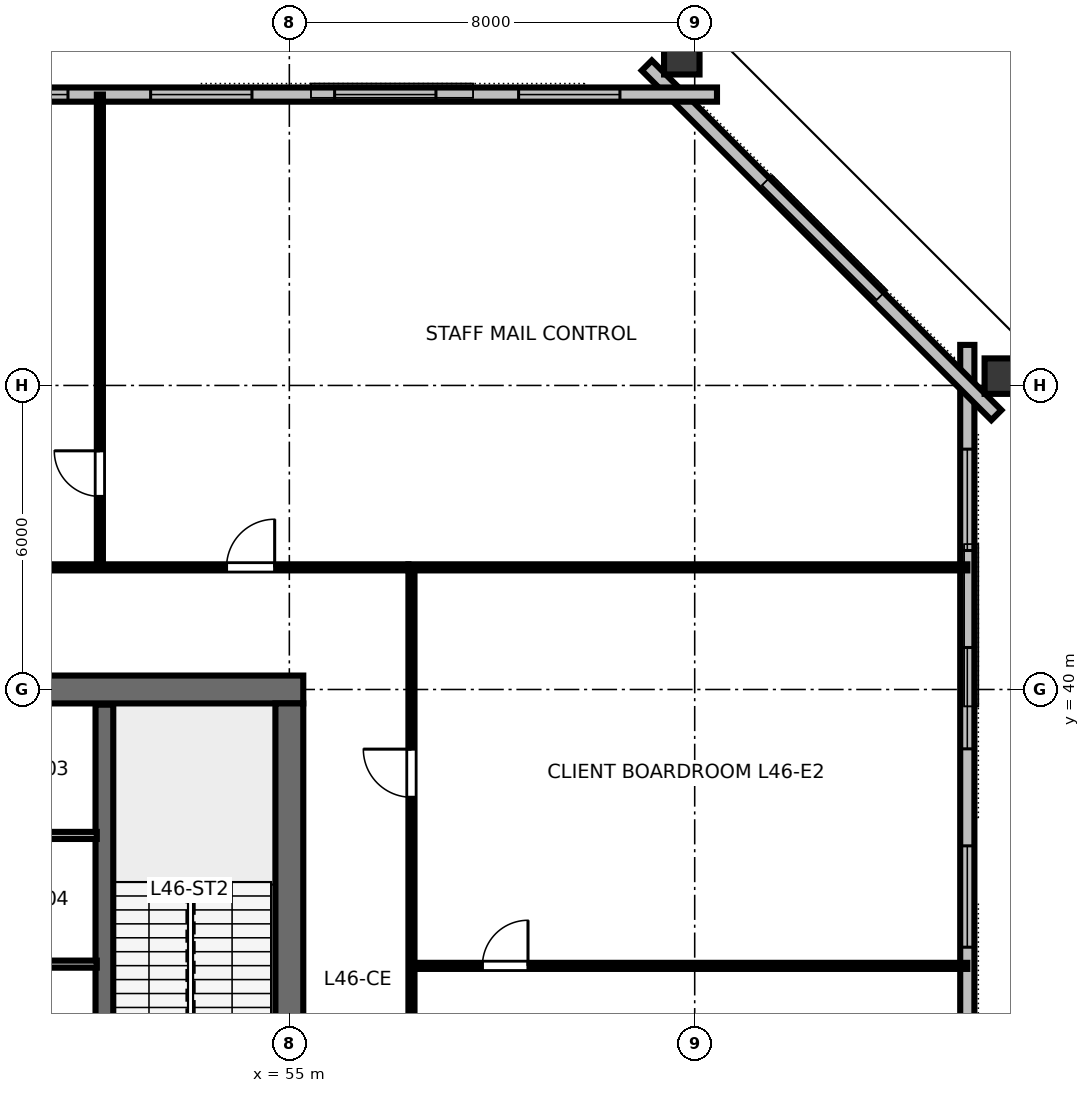
"""IFC4 building model, lengths in metres.
Left out: names, types, materials, properties, quantities, classifications, styles, units other than length and angle.
Written with IfcOpenShell. Run it as: python <this file> out.ifc"""

import sys

from ifc_helpers import new_model, si_unit, direction, frame, frame_2d, origin, origin_2d, place, context, subcontext, project, spatial, rectangle, hollow_rectangle, extrude, element, fill, save


model = new_model("IFC4")
c1 = context("Model", 3, precision=1e-05, world=origin(), true_north=direction((0.0, 1.0)))
c2 = subcontext(c1, "Body", "Model", "MODEL_VIEW")
j1 = project(units=[si_unit("LENGTHUNIT", "METRE"), si_unit("PLANEANGLEUNIT", "RADIAN")], contexts=[c1])
p1 = place(None, origin())
s1 = spatial("IfcSite", under=j1, at=p1, CompositionType="ELEMENT")
p2 = place(p1, origin())
s2 = spatial("IfcBuilding", under=s1, at=p2, CompositionType="ELEMENT")
p3 = place(p2, frame((0.0, 0.0, 177.0)))
s3 = spatial("IfcBuildingStorey", under=s2, at=p3, CompositionType="ELEMENT", Elevation=177.0)
p4 = place(p3, frame((36.725, 40.0, 0.0), z_axis=(0.0, 0.0, 1.0), x_axis=(1.0, 0.0, 0.0)))
e1 = element("IfcWall", 1, at=p4, inside=s3, PredefinedType="SHEAR", context=c2, shape_type="SweptSolid", body=[
    extrude(rectangle(XDim=18.55, YDim=0.55, at=frame_2d((9.275, 0.0))), origin(), (0.0, 0.0, 1.0), 3.36),
])
p5 = place(p4, frame((10.575, 0.0, 0.0)))
e2 = element("IfcOpeningElement", 2, at=p5, cuts=e1, PredefinedType="OPENING", context=c2, shape_type="SweptSolid", body=[
    extrude(rectangle(XDim=1.0, YDim=2.15, at=frame_2d((0.5, 1.075))), frame((0.0, 0.285, 0.0), z_axis=(0.0, -1.0, 0.0), x_axis=(1.0, 0.0, 0.0)), (0.0, 0.0, 1.0), 0.57),
])
p6 = place(p3, frame((55.0, 24.275, 0.0), z_axis=(0.0, 0.0, 1.0), x_axis=(0.0, 1.0, 0.0)))
e3 = element("IfcWall", 3, at=p6, inside=s3, PredefinedType="SHEAR", context=c2, shape_type="SweptSolid", body=[
    extrude(rectangle(XDim=15.45, YDim=0.55, at=frame_2d((7.725, 0.0))), origin(), (0.0, 0.0, 1.0), 3.36),
])
p7 = place(p6, frame((5.25, 0.0, 0.0)))
e4 = element("IfcOpeningElement", 4, at=p7, cuts=e3, PredefinedType="OPENING", context=c2, shape_type="SweptSolid", body=[
    extrude(rectangle(XDim=1.15, YDim=2.15, at=frame_2d((0.575, 1.075))), frame((0.0, 0.285, 0.0), z_axis=(0.0, -1.0, 0.0), x_axis=(1.0, 0.0, 0.0)), (0.0, 0.0, 1.0), 0.57),
])
for number, where, z_axis, x_axis in (
    (5, (69.146, 46.184, 0.0), (0.0, 0.0, 1.0), (0.0, 1.0, 0.0)),
    (6, (62.745, 52.562, 0.0), (0.0, 0.0, 1.0), (1.0, 0.0, 0.0)),
):
    element("IfcColumn", number, at=place(p3, frame(where, z_axis=z_axis, x_axis=x_axis)), inside=s3, PredefinedType="COLUMN", context=c2, shape_type="SweptSolid", body=[
        extrude(hollow_rectangle(XDim=0.7, YDim=0.85, WallThickness=0.04, at=origin_2d()), origin(), (0.0, 0.0, 1.0), 3.358),
    ])
p8 = place(p3, frame((68.38, 17.2, 0.0), z_axis=(0.0, 0.0, 1.0), x_axis=(0.0, 1.0, 0.0)))
e7 = element("IfcWall", 7, at=p8, inside=s3, PredefinedType="STANDARD", context=c2, shape_type="SweptSolid", body=[
    extrude(rectangle(XDim=29.6, YDim=0.28, at=frame_2d((14.8, 0.0))), origin(), (0.0, 0.0, 1.0), 3.36),
])
p9 = place(p8, frame((2.057, 0.0, 0.8)))
e8 = element("IfcOpeningElement", 8, at=p9, cuts=e7, PredefinedType="OPENING", context=c2, shape_type="SweptSolid", body=[
    extrude(rectangle(XDim=2.0, YDim=1.95, at=frame_2d((1.0, 0.975))), frame((0.0, 0.15, 0.0), z_axis=(0.0, -1.0, 0.0), x_axis=(1.0, 0.0, 0.0)), (0.0, 0.0, 1.0), 0.3),
])
p10 = place(p8, frame((5.971, 0.0, 0.8)))
e9 = element("IfcOpeningElement", 9, at=p10, cuts=e7, PredefinedType="OPENING", context=c2, shape_type="SweptSolid", body=[
    extrude(rectangle(XDim=2.0, YDim=1.95, at=frame_2d((1.0, 0.975))), frame((0.0, 0.15, 0.0), z_axis=(0.0, -1.0, 0.0), x_axis=(1.0, 0.0, 0.0)), (0.0, 0.0, 1.0), 0.3),
])
p11 = place(p8, frame((9.886, 0.0, 0.8)))
e10 = element("IfcOpeningElement", 10, at=p11, cuts=e7, PredefinedType="OPENING", context=c2, shape_type="SweptSolid", body=[
    extrude(rectangle(XDim=2.0, YDim=1.95, at=frame_2d((1.0, 0.975))), frame((0.0, 0.15, 0.0), z_axis=(0.0, -1.0, 0.0), x_axis=(1.0, 0.0, 0.0)), (0.0, 0.0, 1.0), 0.3),
])
p12 = place(p8, frame((17.714, 0.0, 0.8)))
e11 = element("IfcOpeningElement", 11, at=p12, cuts=e7, PredefinedType="OPENING", context=c2, shape_type="SweptSolid", body=[
    extrude(rectangle(XDim=2.0, YDim=1.95, at=frame_2d((1.0, 0.975))), frame((0.0, 0.15, 0.0), z_axis=(0.0, -1.0, 0.0), x_axis=(1.0, 0.0, 0.0)), (0.0, 0.0, 1.0), 0.3),
])
p13 = place(p8, frame((21.629, 0.0, 0.8)))
e12 = element("IfcOpeningElement", 12, at=p13, cuts=e7, PredefinedType="OPENING", context=c2, shape_type="SweptSolid", body=[
    extrude(rectangle(XDim=2.0, YDim=1.95, at=frame_2d((1.0, 0.975))), frame((0.0, 0.15, 0.0), z_axis=(0.0, -1.0, 0.0), x_axis=(1.0, 0.0, 0.0)), (0.0, 0.0, 1.0), 0.3),
])
p14 = place(p8, frame((25.543, 0.0, 0.8)))
e13 = element("IfcOpeningElement", 13, at=p14, cuts=e7, PredefinedType="OPENING", context=c2, shape_type="SweptSolid", body=[
    extrude(rectangle(XDim=2.0, YDim=1.95, at=frame_2d((1.0, 0.975))), frame((0.0, 0.15, 0.0), z_axis=(0.0, -1.0, 0.0), x_axis=(1.0, 0.0, 0.0)), (0.0, 0.0, 1.0), 0.3),
])
p15 = place(p3, frame((68.954, 45.415, 0.0), z_axis=(0.0, 0.0, 1.0), x_axis=(-0.707106781187, 0.707106781187, 0.0)))
e14 = element("IfcWall", 14, at=p15, inside=s3, PredefinedType="STANDARD", context=c2, shape_type="SweptSolid", body=[
    extrude(rectangle(XDim=9.757, YDim=0.28, at=frame_2d((4.879, 0.0))), origin(), (0.0, 0.0, 1.0), 3.36),
])
p16 = place(p3, frame((63.44, 51.74, 0.0), z_axis=(0.0, 0.0, 1.0), x_axis=(-1.0, 0.0, 0.0)))
e15 = element("IfcWall", 15, at=p16, inside=s3, PredefinedType="STANDARD", context=c2, shape_type="SweptSolid", body=[
    extrude(rectangle(XDim=34.88, YDim=0.28, at=frame_2d((17.44, 0.0))), origin(), (0.0, 0.0, 1.0), 3.36),
])
p17 = place(p16, frame((1.916, 0.0, 0.8)))
e16 = element("IfcOpeningElement", 16, at=p17, cuts=e15, PredefinedType="OPENING", context=c2, shape_type="SweptSolid", body=[
    extrude(rectangle(XDim=2.0, YDim=1.95, at=frame_2d((1.0, 0.975))), frame((0.0, 0.15, 0.0), z_axis=(0.0, -1.0, 0.0), x_axis=(1.0, 0.0, 0.0)), (0.0, 0.0, 1.0), 0.3),
])
p18 = place(p16, frame((5.547, 0.0, 0.8)))
e17 = element("IfcOpeningElement", 17, at=p18, cuts=e15, PredefinedType="OPENING", context=c2, shape_type="SweptSolid", body=[
    extrude(rectangle(XDim=2.0, YDim=1.95, at=frame_2d((1.0, 0.975))), frame((0.0, 0.15, 0.0), z_axis=(0.0, -1.0, 0.0), x_axis=(1.0, 0.0, 0.0)), (0.0, 0.0, 1.0), 0.3),
])
p19 = place(p16, frame((9.178, 0.0, 0.8)))
e18 = element("IfcOpeningElement", 18, at=p19, cuts=e15, PredefinedType="OPENING", context=c2, shape_type="SweptSolid", body=[
    extrude(rectangle(XDim=2.0, YDim=1.95, at=frame_2d((1.0, 0.975))), frame((0.0, 0.15, 0.0), z_axis=(0.0, -1.0, 0.0), x_axis=(1.0, 0.0, 0.0)), (0.0, 0.0, 1.0), 0.3),
])
p20 = place(p16, frame((12.809, 0.0, 0.8)))
e19 = element("IfcOpeningElement", 19, at=p20, cuts=e15, PredefinedType="OPENING", context=c2, shape_type="SweptSolid", body=[
    extrude(rectangle(XDim=2.0, YDim=1.95, at=frame_2d((1.0, 0.975))), frame((0.0, 0.15, 0.0), z_axis=(0.0, -1.0, 0.0), x_axis=(1.0, 0.0, 0.0)), (0.0, 0.0, 1.0), 0.3),
])
p21 = place(p16, frame((20.071, 0.0, 0.8)))
e20 = element("IfcOpeningElement", 20, at=p21, cuts=e15, PredefinedType="OPENING", context=c2, shape_type="SweptSolid", body=[
    extrude(rectangle(XDim=2.0, YDim=1.95, at=frame_2d((1.0, 0.975))), frame((0.0, 0.15, 0.0), z_axis=(0.0, -1.0, 0.0), x_axis=(1.0, 0.0, 0.0)), (0.0, 0.0, 1.0), 0.3),
])
p22 = place(p16, frame((23.702, 0.0, 0.8)))
e21 = element("IfcOpeningElement", 21, at=p22, cuts=e15, PredefinedType="OPENING", context=c2, shape_type="SweptSolid", body=[
    extrude(rectangle(XDim=2.0, YDim=1.95, at=frame_2d((1.0, 0.975))), frame((0.0, 0.15, 0.0), z_axis=(0.0, -1.0, 0.0), x_axis=(1.0, 0.0, 0.0)), (0.0, 0.0, 1.0), 0.3),
])
p23 = place(p16, frame((27.333, 0.0, 0.8)))
e22 = element("IfcOpeningElement", 22, at=p23, cuts=e15, PredefinedType="OPENING", context=c2, shape_type="SweptSolid", body=[
    extrude(rectangle(XDim=2.0, YDim=1.95, at=frame_2d((1.0, 0.975))), frame((0.0, 0.15, 0.0), z_axis=(0.0, -1.0, 0.0), x_axis=(1.0, 0.0, 0.0)), (0.0, 0.0, 1.0), 0.3),
])
p24 = place(p16, frame((30.964, 0.0, 0.8)))
e23 = element("IfcOpeningElement", 23, at=p24, cuts=e15, PredefinedType="OPENING", context=c2, shape_type="SweptSolid", body=[
    extrude(rectangle(XDim=2.0, YDim=1.95, at=frame_2d((1.0, 0.975))), frame((0.0, 0.15, 0.0), z_axis=(0.0, -1.0, 0.0), x_axis=(1.0, 0.0, 0.0)), (0.0, 0.0, 1.0), 0.3),
])
p25 = place(p3, frame((51.35, 32.0, 0.0), z_axis=(0.0, 0.0, 1.0), x_axis=(0.0, 1.0, 0.0)))
e24 = element("IfcWall", 24, at=p25, inside=s3, PredefinedType="SHEAR", context=c2, shape_type="SweptSolid", body=[
    extrude(rectangle(XDim=7.7, YDim=0.35, at=frame_2d((3.85, 0.0))), origin(), (0.0, 0.0, 1.0), 3.6),
])
for number, where, z_axis, x_axis in (
    (25, (48.8, 34.58, 0.0), (0.0, 0.0, 1.0), (1.0, 0.0, 0.0)),
    (26, (48.8, 37.12, 0.0), (0.0, 0.0, 1.0), (1.0, 0.0, 0.0)),
):
    element("IfcWall", number, at=place(p3, frame(where, z_axis=z_axis, x_axis=x_axis)), inside=s3, PredefinedType="PARTITIONING", context=c2, shape_type="SweptSolid", body=[
        extrude(rectangle(XDim=2.4, YDim=0.14, at=frame_2d((1.2, 0.0))), origin(), (0.0, 0.0, 1.0), 3.36),
    ])
p26 = place(p3, frame((51.261, 42.41, 0.0), z_axis=(0.0, 0.0, 1.0), x_axis=(0.0, 1.0, 0.0)))
e27 = element("IfcWall", 27, at=p26, inside=s3, PredefinedType="PARTITIONING", context=c2, shape_type="SweptSolid", body=[
    extrude(rectangle(XDim=9.33, YDim=0.12, at=frame_2d((4.665, 0.0))), origin(), (0.0, 0.0, 1.0), 2.64),
])
p27 = place(p26, frame((1.4, 0.0, 0.0)))
e28 = element("IfcOpeningElement", 28, at=p27, cuts=e27, PredefinedType="OPENING", context=c2, shape_type="SweptSolid", body=[
    extrude(rectangle(XDim=0.9, YDim=2.15, at=frame_2d((0.45, 1.075))), frame((0.0, 0.07, 0.0), z_axis=(0.0, -1.0, 0.0), x_axis=(1.0, 0.0, 0.0)), (0.0, 0.0, 1.0), 0.14),
])
p28 = place(p3, frame((47.02, 42.41, 0.0), z_axis=(0.0, 0.0, 1.0), x_axis=(1.0, 0.0, 0.0)))
e29 = element("IfcWall", 29, at=p28, inside=s3, PredefinedType="PARTITIONING", context=c2, shape_type="SweptSolid", body=[
    extrude(rectangle(XDim=10.33, YDim=0.12, at=frame_2d((5.165, 0.0))), origin(), (0.0, 0.0, 1.0), 2.64),
])
p29 = place(p28, frame((1.709, 0.0, 0.0)))
e30 = element("IfcOpeningElement", 30, at=p29, cuts=e29, PredefinedType="OPENING", context=c2, shape_type="SweptSolid", body=[
    extrude(rectangle(XDim=0.95, YDim=2.15, at=frame_2d((0.475, 1.075))), frame((0.0, 0.07, 0.0), z_axis=(0.0, -1.0, 0.0), x_axis=(1.0, 0.0, 0.0)), (0.0, 0.0, 1.0), 0.14),
])
p30 = place(p28, frame((6.74, 0.0, 0.0)))
e31 = element("IfcOpeningElement", 31, at=p30, cuts=e29, PredefinedType="OPENING", context=c2, shape_type="SweptSolid", body=[
    extrude(rectangle(XDim=0.95, YDim=2.15, at=frame_2d((0.475, 1.075))), frame((0.0, 0.07, 0.0), z_axis=(0.0, -1.0, 0.0), x_axis=(1.0, 0.0, 0.0)), (0.0, 0.0, 1.0), 0.14),
])
p31 = place(p3, frame((57.41, 34.546, 0.0), z_axis=(0.0, 0.0, 1.0), x_axis=(1.0, 0.0, 0.0)))
e32 = element("IfcWall", 32, at=p31, inside=s3, PredefinedType="PARTITIONING", context=c2, shape_type="SweptSolid", body=[
    extrude(rectangle(XDim=10.97, YDim=0.12, at=frame_2d((5.485, 0.0))), origin(), (0.0, 0.0, 1.0), 2.64),
])
p32 = place(p31, frame((1.4, 0.0, 0.0)))
e33 = element("IfcOpeningElement", 33, at=p32, cuts=e32, PredefinedType="OPENING", context=c2, shape_type="SweptSolid", body=[
    extrude(rectangle(XDim=0.9, YDim=2.15, at=frame_2d((0.45, 1.075))), frame((0.0, 0.07, 0.0), z_axis=(0.0, -1.0, 0.0), x_axis=(1.0, 0.0, 0.0)), (0.0, 0.0, 1.0), 0.14),
])
p33 = place(p3, frame((57.41, 21.65, 0.0), z_axis=(0.0, 0.0, 1.0), x_axis=(0.0, 1.0, 0.0)))
e34 = element("IfcWall", 34, at=p33, inside=s3, PredefinedType="PARTITIONING", context=c2, shape_type="SweptSolid", body=[
    extrude(rectangle(XDim=20.7, YDim=0.12, at=frame_2d((10.35, 0.0))), origin(), (0.0, 0.0, 1.0), 2.64),
])
p34 = place(p33, frame((6.073, 0.0, 0.0)))
e35 = element("IfcOpeningElement", 35, at=p34, cuts=e34, PredefinedType="OPENING", context=c2, shape_type="SweptSolid", body=[
    extrude(rectangle(XDim=0.95, YDim=2.15, at=frame_2d((0.475, 1.075))), frame((0.0, 0.07, 0.0), z_axis=(0.0, -1.0, 0.0), x_axis=(1.0, 0.0, 0.0)), (0.0, 0.0, 1.0), 0.14),
])
p35 = place(p33, frame((16.223, 0.0, 0.0)))
e36 = element("IfcOpeningElement", 36, at=p35, cuts=e34, PredefinedType="OPENING", context=c2, shape_type="SweptSolid", body=[
    extrude(rectangle(XDim=0.95, YDim=2.15, at=frame_2d((0.475, 1.075))), frame((0.0, 0.07, 0.0), z_axis=(0.0, -1.0, 0.0), x_axis=(1.0, 0.0, 0.0)), (0.0, 0.0, 1.0), 0.14),
])
p36 = place(p3, frame((57.35, 42.41, 0.0), z_axis=(0.0, 0.0, 1.0), x_axis=(1.0, 0.0, 0.0)))
e37 = element("IfcWall", 37, at=p36, inside=s3, PredefinedType="PARTITIONING", context=c2, shape_type="SweptSolid", body=[
    extrude(rectangle(XDim=11.03, YDim=0.12, at=frame_2d((5.515, 0.0))), origin(), (0.0, 0.0, 1.0), 2.64),
])
p37 = place(p12, origin())
e38 = element("IfcWindow", 38, at=p37, inside=s3, PartitioningType="SINGLE_PANEL", PredefinedType="WINDOW", context=c2, shape_type="SweptSolid", body=[
    extrude(rectangle(XDim=2.0, YDim=1.95, at=frame_2d((1.0, 0.975))), frame((0.0, 0.03, 0.0), z_axis=(0.0, -1.0, 0.0), x_axis=(1.0, 0.0, 0.0)), (0.0, 0.0, 1.0), 0.06),
])
fill(e11, e38)
p38 = place(p13, origin())
e39 = element("IfcWindow", 39, at=p38, inside=s3, PartitioningType="SINGLE_PANEL", PredefinedType="WINDOW", context=c2, shape_type="SweptSolid", body=[
    extrude(rectangle(XDim=2.0, YDim=1.95, at=frame_2d((1.0, 0.975))), frame((0.0, 0.03, 0.0), z_axis=(0.0, -1.0, 0.0), x_axis=(1.0, 0.0, 0.0)), (0.0, 0.0, 1.0), 0.06),
])
fill(e12, e39)
p39 = place(p14, origin())
e40 = element("IfcWindow", 40, at=p39, inside=s3, PartitioningType="SINGLE_PANEL", PredefinedType="WINDOW", context=c2, shape_type="SweptSolid", body=[
    extrude(rectangle(XDim=2.0, YDim=1.95, at=frame_2d((1.0, 0.975))), frame((0.0, 0.03, 0.0), z_axis=(0.0, -1.0, 0.0), x_axis=(1.0, 0.0, 0.0)), (0.0, 0.0, 1.0), 0.06),
])
fill(e13, e40)
p40 = place(p17, origin())
e41 = element("IfcWindow", 41, at=p40, inside=s3, PartitioningType="SINGLE_PANEL", PredefinedType="WINDOW", context=c2, shape_type="SweptSolid", body=[
    extrude(rectangle(XDim=2.0, YDim=1.95, at=frame_2d((1.0, 0.975))), frame((0.0, 0.03, 0.0), z_axis=(0.0, -1.0, 0.0), x_axis=(1.0, 0.0, 0.0)), (0.0, 0.0, 1.0), 0.06),
])
fill(e16, e41)
p41 = place(p18, origin())
e42 = element("IfcWindow", 42, at=p41, inside=s3, PartitioningType="SINGLE_PANEL", PredefinedType="WINDOW", context=c2, shape_type="SweptSolid", body=[
    extrude(rectangle(XDim=2.0, YDim=1.95, at=frame_2d((1.0, 0.975))), frame((0.0, 0.03, 0.0), z_axis=(0.0, -1.0, 0.0), x_axis=(1.0, 0.0, 0.0)), (0.0, 0.0, 1.0), 0.06),
])
fill(e17, e42)
p42 = place(p19, origin())
e43 = element("IfcWindow", 43, at=p42, inside=s3, PartitioningType="SINGLE_PANEL", PredefinedType="WINDOW", context=c2, shape_type="SweptSolid", body=[
    extrude(rectangle(XDim=2.0, YDim=1.95, at=frame_2d((1.0, 0.975))), frame((0.0, 0.03, 0.0), z_axis=(0.0, -1.0, 0.0), x_axis=(1.0, 0.0, 0.0)), (0.0, 0.0, 1.0), 0.06),
])
fill(e18, e43)
p43 = place(p20, origin())
e44 = element("IfcWindow", 44, at=p43, inside=s3, PartitioningType="SINGLE_PANEL", PredefinedType="WINDOW", context=c2, shape_type="SweptSolid", body=[
    extrude(rectangle(XDim=2.0, YDim=1.95, at=frame_2d((1.0, 0.975))), frame((0.0, 0.03, 0.0), z_axis=(0.0, -1.0, 0.0), x_axis=(1.0, 0.0, 0.0)), (0.0, 0.0, 1.0), 0.06),
])
fill(e19, e44)
p44 = place(p27, origin())
e45 = element("IfcDoor", 45, at=p44, inside=s3, OperationType="SINGLE_SWING_RIGHT", PredefinedType="DOOR", context=c2, shape_type="SweptSolid", body=[
    extrude(rectangle(XDim=0.9, YDim=2.15, at=frame_2d((0.45, 1.075))), frame((0.0, 0.025, 0.0), z_axis=(0.0, -1.0, 0.0), x_axis=(1.0, 0.0, 0.0)), (0.0, 0.0, 1.0), 0.05),
])
fill(e28, e45)
p45 = place(p30, origin())
e46 = element("IfcDoor", 46, at=p45, inside=s3, OperationType="SINGLE_SWING_RIGHT", PredefinedType="DOOR", context=c2, shape_type="SweptSolid", body=[
    extrude(rectangle(XDim=0.95, YDim=2.15, at=frame_2d((0.475, 1.075))), frame((0.0, 0.025, 0.0), z_axis=(0.0, -1.0, 0.0), x_axis=(1.0, 0.0, 0.0)), (0.0, 0.0, 1.0), 0.05),
])
fill(e31, e46)
p46 = place(p32, origin())
e47 = element("IfcDoor", 47, at=p46, inside=s3, OperationType="SINGLE_SWING_RIGHT", PredefinedType="DOOR", context=c2, shape_type="SweptSolid", body=[
    extrude(rectangle(XDim=0.9, YDim=2.15, at=frame_2d((0.45, 1.075))), frame((0.0, 0.025, 0.0), z_axis=(0.0, -1.0, 0.0), x_axis=(1.0, 0.0, 0.0)), (0.0, 0.0, 1.0), 0.05),
])
fill(e33, e47)
p47 = place(p35, origin())
e48 = element("IfcDoor", 48, at=p47, inside=s3, OperationType="SINGLE_SWING_RIGHT", PredefinedType="DOOR", context=c2, shape_type="SweptSolid", body=[
    extrude(rectangle(XDim=0.95, YDim=2.15, at=frame_2d((0.475, 1.075))), frame((0.0, 0.025, 0.0), z_axis=(0.0, -1.0, 0.0), x_axis=(1.0, 0.0, 0.0)), (0.0, 0.0, 1.0), 0.05),
])
fill(e36, e48)
save(model, sys.argv[1])
